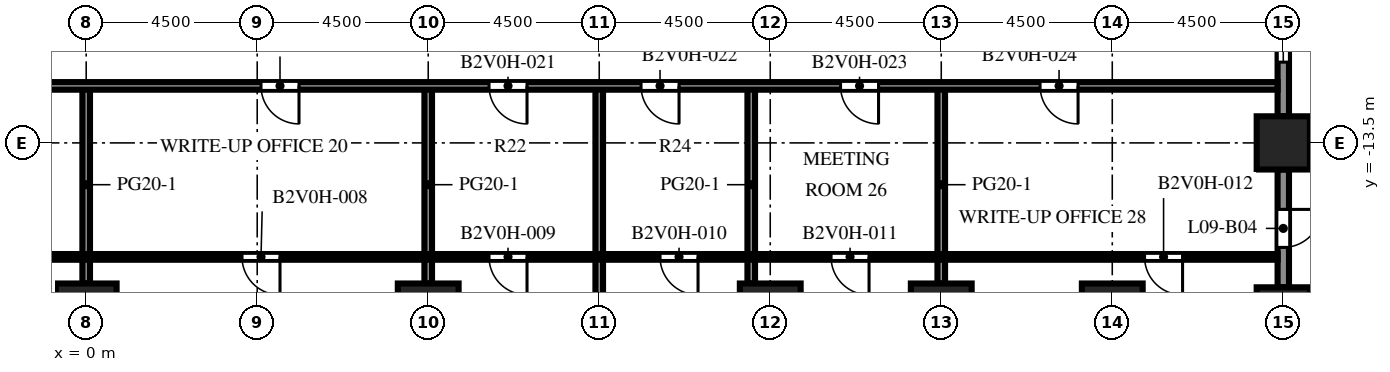
"""IFC4 building model, lengths in metres.
Left out: names, types, materials, properties, quantities, classifications, styles, units other than length and angle.
Written with IfcOpenShell. Run it as: python <this file> out.ifc"""

import sys

from ifc_helpers import new_model, si_unit, direction, frame, frame_2d, origin, origin_2d, place, context, subcontext, project, spatial, rectangle, extrude, element, fill, save


model = new_model("IFC4")
c1 = context("Model", 3, precision=1e-05, world=origin(), true_north=direction((0.0, 1.0)))
c2 = subcontext(c1, "Body", "Model", "MODEL_VIEW")
j1 = project(units=[si_unit("LENGTHUNIT", "METRE"), si_unit("PLANEANGLEUNIT", "RADIAN")], contexts=[c1])
p1 = place(None, origin())
s1 = spatial("IfcSite", under=j1, at=p1, CompositionType="ELEMENT")
p2 = place(p1, origin())
s2 = spatial("IfcBuilding", under=s1, at=p2, CompositionType="ELEMENT")
p3 = place(p2, frame((0.0, 0.0, 41.9)))
s3 = spatial("IfcBuildingStorey", under=s2, at=p3, CompositionType="ELEMENT", Elevation=41.9)
for number, where, z_axis, x_axis in (
    (1, (31.5, -18.0, -0.45), (0.0, 0.0, 1.0), (1.0, 0.0, 0.0)),
    (2, (31.5, -13.5, -0.45), (0.0, 0.0, 1.0), (1.0, 0.0, 0.0)),
):
    element("IfcColumn", number, at=place(p3, frame(where, z_axis=z_axis, x_axis=x_axis)), inside=s3, PredefinedType="COLUMN", context=c2, shape_type="SweptSolid", body=[
        extrude(rectangle(XDim=1.4, YDim=1.4, at=origin_2d()), origin(), (0.0, 0.0, 1.0), 4.55),
    ])
for number, where, z_axis, x_axis in (
    (3, (0.0, -18.0, 0.0), (0.0, 0.0, 1.0), (1.0, 0.0, 0.0)),
    (4, (9.0, -18.0, 0.0), (0.0, 0.0, 1.0), (1.0, 0.0, 0.0)),
):
    element("IfcColumn", number, at=place(p3, frame(where, z_axis=z_axis, x_axis=x_axis)), inside=s3, PredefinedType="COLUMN", context=c2, shape_type="SweptSolid", body=[
        extrude(rectangle(XDim=1.6, YDim=1.6, at=origin_2d()), origin(), (0.0, 0.0, 1.0), 4.1),
    ])
for number, where, z_axis, x_axis in (
    (5, (18.0, -18.0, -0.45), (0.0, 0.0, 1.0), (1.0, 0.0, 0.0)),
    (6, (22.5, -18.0, -0.45), (0.0, 0.0, 1.0), (1.0, 0.0, 0.0)),
    (7, (27.0, -18.0, -0.45), (0.0, 0.0, 1.0), (1.0, 0.0, 0.0)),
):
    element("IfcColumn", number, at=place(p3, frame(where, z_axis=z_axis, x_axis=x_axis)), inside=s3, PredefinedType="COLUMN", context=c2, shape_type="SweptSolid", body=[
        extrude(rectangle(XDim=1.6, YDim=1.6, at=origin_2d()), origin(), (0.0, 0.0, 1.0), 4.55),
    ])
p4 = place(p3, frame((31.5, -14.2, 0.0), z_axis=(0.0, 0.0, 1.0), x_axis=(0.0, -1.0, 0.0)))
e8 = element("IfcWall", 8, at=p4, inside=s3, PredefinedType="SOLIDWALL", context=c2, shape_type="SweptSolid", body=[
    extrude(rectangle(XDim=3.1, YDim=0.3, at=frame_2d((1.55, 0.0))), origin(), (0.0, 0.0, 1.0), 2.75),
])
p5 = place(p4, frame((1.05, 0.0, 0.0)))
e9 = element("IfcOpeningElement", 9, at=p5, cuts=e8, PredefinedType="OPENING", context=c2, shape_type="SweptSolid", body=[
    extrude(rectangle(XDim=1.0, YDim=2.2, at=frame_2d((0.5, 1.1))), frame((0.0, 0.16, 0.0), z_axis=(0.0, -1.0, 0.0), x_axis=(1.0, 0.0, 0.0)), (0.0, 0.0, 1.0), 0.32),
])
p6 = place(p3, frame((31.5, -9.7, 0.0), z_axis=(0.0, 0.0, 1.0), x_axis=(0.0, -1.0, 0.0)))
e10 = element("IfcWall", 10, at=p6, inside=s3, PredefinedType="SOLIDWALL", context=c2, shape_type="SweptSolid", body=[
    extrude(rectangle(XDim=3.1, YDim=0.3, at=frame_2d((1.55, 0.0))), origin(), (0.0, 0.0, 1.0), 2.75),
])
p7 = place(p6, frame((0.475, 0.0, 0.8)))
e11 = element("IfcOpeningElement", 11, at=p7, cuts=e10, PredefinedType="OPENING", context=c2, shape_type="SweptSolid", body=[
    extrude(rectangle(XDim=1.2, YDim=1.7, at=frame_2d((0.6, 0.85))), frame((0.0, 0.16, 0.0), z_axis=(0.0, -1.0, 0.0), x_axis=(1.0, 0.0, 0.0)), (0.0, 0.0, 1.0), 0.32),
])
for number, where, z_axis, x_axis in (
    (12, (0.0, -17.2, 0.0), (0.0, 0.0, 1.0), (0.0, 1.0, 0.0)),
    (13, (9.0, -17.2, 0.0), (0.0, 0.0, 1.0), (0.0, 1.0, 0.0)),
):
    element("IfcWall", number, at=place(p3, frame(where, z_axis=z_axis, x_axis=x_axis)), inside=s3, PredefinedType="PARTITIONING", context=c2, shape_type="SweptSolid", body=[
        extrude(rectangle(XDim=5.2, YDim=0.2, at=frame_2d((2.6, 0.0))), origin(), (0.0, 0.0, 1.0), 3.65),
    ])
p8 = place(p3, frame((13.5, -26.3, 0.0), z_axis=(0.0, 0.0, 1.0), x_axis=(0.0, 1.0, 0.0)))
e14 = element("IfcWall", 14, at=p8, inside=s3, PredefinedType="PARTITIONING", context=c2, shape_type="SweptSolid", body=[
    extrude(rectangle(XDim=14.3, YDim=0.2, at=frame_2d((7.15, 0.0))), origin(), (0.0, 0.0, 1.0), 3.65),
])
for number, where, z_axis, x_axis in (
    (15, (17.5, -17.2, 0.0), (0.0, 0.0, 1.0), (0.0, 1.0, 0.0)),
    (16, (22.5, -17.2, 0.0), (0.0, 0.0, 1.0), (0.0, 1.0, 0.0)),
):
    element("IfcWall", number, at=place(p3, frame(where, z_axis=z_axis, x_axis=x_axis)), inside=s3, PredefinedType="PARTITIONING", context=c2, shape_type="SweptSolid", body=[
        extrude(rectangle(XDim=5.2, YDim=0.2, at=frame_2d((2.6, 0.0))), origin(), (0.0, 0.0, 1.0), 3.65),
    ])
p9 = place(p3, frame((31.35, -16.5, 0.0), z_axis=(0.0, 0.0, 1.0), x_axis=(-1.0, 0.0, 0.0)))
e17 = element("IfcWall", 17, at=p9, inside=s3, PredefinedType="PARTITIONING", context=c2, shape_type="SweptSolid", body=[
    extrude(rectangle(XDim=53.7, YDim=0.15, at=frame_2d((26.85, 0.0))), origin(), (0.0, 0.0, 1.0), 3.65),
])
p10 = place(p9, frame((50.75, 0.0, 0.0)))
e18 = element("IfcOpeningElement", 18, at=p10, cuts=e17, PredefinedType="OPENING", context=c2, shape_type="SweptSolid", body=[
    extrude(rectangle(XDim=1.0, YDim=2.1, at=frame_2d((0.5, 1.05))), frame((0.0, 0.085, 0.0), z_axis=(0.0, -1.0, 0.0), x_axis=(1.0, 0.0, 0.0)), (0.0, 0.0, 1.0), 0.17),
])
p11 = place(p9, frame((43.75, 0.0, 0.0)))
e19 = element("IfcOpeningElement", 19, at=p11, cuts=e17, PredefinedType="OPENING", context=c2, shape_type="SweptSolid", body=[
    extrude(rectangle(XDim=1.0, YDim=2.1, at=frame_2d((0.5, 1.05))), frame((0.0, 0.085, 0.0), z_axis=(0.0, -1.0, 0.0), x_axis=(1.0, 0.0, 0.0)), (0.0, 0.0, 1.0), 0.17),
])
p12 = place(p9, frame((33.0, 0.0, 0.0)))
e20 = element("IfcOpeningElement", 20, at=p12, cuts=e17, PredefinedType="OPENING", context=c2, shape_type="SweptSolid", body=[
    extrude(rectangle(XDim=1.0, YDim=2.1, at=frame_2d((0.5, 1.05))), frame((0.0, 0.085, 0.0), z_axis=(0.0, -1.0, 0.0), x_axis=(1.0, 0.0, 0.0)), (0.0, 0.0, 1.0), 0.17),
])
p13 = place(p9, frame((26.25, 0.0, 0.0)))
e21 = element("IfcOpeningElement", 21, at=p13, cuts=e17, PredefinedType="OPENING", context=c2, shape_type="SweptSolid", body=[
    extrude(rectangle(XDim=1.0, YDim=2.1, at=frame_2d((0.5, 1.05))), frame((0.0, 0.085, 0.0), z_axis=(0.0, -1.0, 0.0), x_axis=(1.0, 0.0, 0.0)), (0.0, 0.0, 1.0), 0.17),
])
p14 = place(p9, frame((19.75, 0.0, 0.0)))
e22 = element("IfcOpeningElement", 22, at=p14, cuts=e17, PredefinedType="OPENING", context=c2, shape_type="SweptSolid", body=[
    extrude(rectangle(XDim=1.0, YDim=2.1, at=frame_2d((0.5, 1.05))), frame((0.0, 0.085, 0.0), z_axis=(0.0, -1.0, 0.0), x_axis=(1.0, 0.0, 0.0)), (0.0, 0.0, 1.0), 0.17),
])
p15 = place(p9, frame((15.25, 0.0, 0.0)))
e23 = element("IfcOpeningElement", 23, at=p15, cuts=e17, PredefinedType="OPENING", context=c2, shape_type="SweptSolid", body=[
    extrude(rectangle(XDim=1.0, YDim=2.1, at=frame_2d((0.5, 1.05))), frame((0.0, 0.085, 0.0), z_axis=(0.0, -1.0, 0.0), x_axis=(1.0, 0.0, 0.0)), (0.0, 0.0, 1.0), 0.17),
])
p16 = place(p9, frame((10.75, 0.0, 0.0)))
e24 = element("IfcOpeningElement", 24, at=p16, cuts=e17, PredefinedType="OPENING", context=c2, shape_type="SweptSolid", body=[
    extrude(rectangle(XDim=1.0, YDim=2.1, at=frame_2d((0.5, 1.05))), frame((0.0, 0.085, 0.0), z_axis=(0.0, -1.0, 0.0), x_axis=(1.0, 0.0, 0.0)), (0.0, 0.0, 1.0), 0.17),
])
p17 = place(p9, frame((2.5, 0.0, 0.0)))
e25 = element("IfcOpeningElement", 25, at=p17, cuts=e17, PredefinedType="OPENING", context=c2, shape_type="SweptSolid", body=[
    extrude(rectangle(XDim=1.0, YDim=2.1, at=frame_2d((0.5, 1.05))), frame((0.0, 0.085, 0.0), z_axis=(0.0, -1.0, 0.0), x_axis=(1.0, 0.0, 0.0)), (0.0, 0.0, 1.0), 0.17),
])
p18 = place(p3, frame((31.35, -12.0, 0.0), z_axis=(0.0, 0.0, 1.0), x_axis=(-1.0, 0.0, 0.0)))
e26 = element("IfcWall", 26, at=p18, inside=s3, PredefinedType="PARTITIONING", context=c2, shape_type="SweptSolid", body=[
    extrude(rectangle(XDim=53.7, YDim=0.2, at=frame_2d((26.85, 0.0))), origin(), (0.0, 0.0, 1.0), 3.65),
])
p19 = place(p18, frame((51.5, 0.0, 0.0)))
e27 = element("IfcOpeningElement", 27, at=p19, cuts=e26, PredefinedType="OPENING", context=c2, shape_type="SweptSolid", body=[
    extrude(rectangle(XDim=1.0, YDim=2.1, at=frame_2d((0.5, 1.05))), frame((0.0, 0.11, 0.0), z_axis=(0.0, -1.0, 0.0), x_axis=(1.0, 0.0, 0.0)), (0.0, 0.0, 1.0), 0.22),
])
p20 = place(p18, frame((40.5, 0.0, 0.0)))
e28 = element("IfcOpeningElement", 28, at=p20, cuts=e26, PredefinedType="OPENING", context=c2, shape_type="SweptSolid", body=[
    extrude(rectangle(XDim=1.0, YDim=2.1, at=frame_2d((0.5, 1.05))), frame((0.0, 0.11, 0.0), z_axis=(0.0, -1.0, 0.0), x_axis=(1.0, 0.0, 0.0)), (0.0, 0.0, 1.0), 0.22),
])
p21 = place(p18, frame((33.5, 0.0, 0.0)))
e29 = element("IfcOpeningElement", 29, at=p21, cuts=e26, PredefinedType="OPENING", context=c2, shape_type="SweptSolid", body=[
    extrude(rectangle(XDim=1.0, YDim=2.1, at=frame_2d((0.5, 1.05))), frame((0.0, 0.11, 0.0), z_axis=(0.0, -1.0, 0.0), x_axis=(1.0, 0.0, 0.0)), (0.0, 0.0, 1.0), 0.22),
])
p22 = place(p18, frame((25.75, 0.0, 0.0)))
e30 = element("IfcOpeningElement", 30, at=p22, cuts=e26, PredefinedType="OPENING", context=c2, shape_type="SweptSolid", body=[
    extrude(rectangle(XDim=1.0, YDim=2.1, at=frame_2d((0.5, 1.05))), frame((0.0, 0.11, 0.0), z_axis=(0.0, -1.0, 0.0), x_axis=(1.0, 0.0, 0.0)), (0.0, 0.0, 1.0), 0.22),
])
p23 = place(p18, frame((19.75, 0.0, 0.0)))
e31 = element("IfcOpeningElement", 31, at=p23, cuts=e26, PredefinedType="OPENING", context=c2, shape_type="SweptSolid", body=[
    extrude(rectangle(XDim=1.0, YDim=2.1, at=frame_2d((0.5, 1.05))), frame((0.0, 0.11, 0.0), z_axis=(0.0, -1.0, 0.0), x_axis=(1.0, 0.0, 0.0)), (0.0, 0.0, 1.0), 0.22),
])
p24 = place(p18, frame((15.75, 0.0, 0.0)))
e32 = element("IfcOpeningElement", 32, at=p24, cuts=e26, PredefinedType="OPENING", context=c2, shape_type="SweptSolid", body=[
    extrude(rectangle(XDim=1.0, YDim=2.1, at=frame_2d((0.5, 1.05))), frame((0.0, 0.11, 0.0), z_axis=(0.0, -1.0, 0.0), x_axis=(1.0, 0.0, 0.0)), (0.0, 0.0, 1.0), 0.22),
])
p25 = place(p18, frame((10.5, 0.0, 0.0)))
e33 = element("IfcOpeningElement", 33, at=p25, cuts=e26, PredefinedType="OPENING", context=c2, shape_type="SweptSolid", body=[
    extrude(rectangle(XDim=1.0, YDim=2.1, at=frame_2d((0.5, 1.05))), frame((0.0, 0.11, 0.0), z_axis=(0.0, -1.0, 0.0), x_axis=(1.0, 0.0, 0.0)), (0.0, 0.0, 1.0), 0.22),
])
p26 = place(p18, frame((5.25, 0.0, 0.0)))
e34 = element("IfcOpeningElement", 34, at=p26, cuts=e26, PredefinedType="OPENING", context=c2, shape_type="SweptSolid", body=[
    extrude(rectangle(XDim=1.0, YDim=2.1, at=frame_2d((0.5, 1.05))), frame((0.0, 0.11, 0.0), z_axis=(0.0, -1.0, 0.0), x_axis=(1.0, 0.0, 0.0)), (0.0, 0.0, 1.0), 0.22),
])
p27 = place(p5, origin())
e35 = element("IfcDoor", 35, at=p27, inside=s3, OperationType="SINGLE_SWING_LEFT", PredefinedType="DOOR", context=c2, shape_type="SweptSolid", body=[
    extrude(rectangle(XDim=1.0, YDim=2.2, at=frame_2d((0.5, 1.1))), frame((0.0, 0.025, 0.0), z_axis=(0.0, -1.0, 0.0), x_axis=(1.0, 0.0, 0.0)), (0.0, 0.0, 1.0), 0.05),
])
fill(e9, e35)
p28 = place(p7, origin())
e36 = element("IfcWindow", 36, at=p28, inside=s3, PartitioningType="SINGLE_PANEL", PredefinedType="WINDOW", context=c2, shape_type="SweptSolid", body=[
    extrude(rectangle(XDim=1.2, YDim=1.7, at=frame_2d((0.6, 0.85))), frame((0.0, 0.03, 0.0), z_axis=(0.0, -1.0, 0.0), x_axis=(1.0, 0.0, 0.0)), (0.0, 0.0, 1.0), 0.06),
])
fill(e11, e36)
p29 = place(p13, origin())
e37 = element("IfcDoor", 37, at=p29, inside=s3, OperationType="SINGLE_SWING_LEFT", PredefinedType="DOOR", context=c2, shape_type="SweptSolid", body=[
    extrude(rectangle(XDim=1.0, YDim=2.1, at=frame_2d((0.5, 1.05))), frame((0.0, 0.025, 0.0), z_axis=(0.0, -1.0, 0.0), x_axis=(1.0, 0.0, 0.0)), (0.0, 0.0, 1.0), 0.05),
])
fill(e21, e37)
p30 = place(p14, origin())
e38 = element("IfcDoor", 38, at=p30, inside=s3, OperationType="SINGLE_SWING_LEFT", PredefinedType="DOOR", context=c2, shape_type="SweptSolid", body=[
    extrude(rectangle(XDim=1.0, YDim=2.1, at=frame_2d((0.5, 1.05))), frame((0.0, 0.025, 0.0), z_axis=(0.0, -1.0, 0.0), x_axis=(1.0, 0.0, 0.0)), (0.0, 0.0, 1.0), 0.05),
])
fill(e22, e38)
p31 = place(p15, origin())
e39 = element("IfcDoor", 39, at=p31, inside=s3, OperationType="SINGLE_SWING_LEFT", PredefinedType="DOOR", context=c2, shape_type="SweptSolid", body=[
    extrude(rectangle(XDim=1.0, YDim=2.1, at=frame_2d((0.5, 1.05))), frame((0.0, 0.025, 0.0), z_axis=(0.0, -1.0, 0.0), x_axis=(1.0, 0.0, 0.0)), (0.0, 0.0, 1.0), 0.05),
])
fill(e23, e39)
p32 = place(p16, origin())
e40 = element("IfcDoor", 40, at=p32, inside=s3, OperationType="SINGLE_SWING_LEFT", PredefinedType="DOOR", context=c2, shape_type="SweptSolid", body=[
    extrude(rectangle(XDim=1.0, YDim=2.1, at=frame_2d((0.5, 1.05))), frame((0.0, 0.025, 0.0), z_axis=(0.0, -1.0, 0.0), x_axis=(1.0, 0.0, 0.0)), (0.0, 0.0, 1.0), 0.05),
])
fill(e24, e40)
p33 = place(p17, origin())
e41 = element("IfcDoor", 41, at=p33, inside=s3, OperationType="SINGLE_SWING_LEFT", PredefinedType="DOOR", context=c2, shape_type="SweptSolid", body=[
    extrude(rectangle(XDim=1.0, YDim=2.1, at=frame_2d((0.5, 1.05))), frame((0.0, 0.025, 0.0), z_axis=(0.0, -1.0, 0.0), x_axis=(1.0, 0.0, 0.0)), (0.0, 0.0, 1.0), 0.05),
])
fill(e25, e41)
p34 = place(p22, origin())
e42 = element("IfcDoor", 42, at=p34, inside=s3, OperationType="SINGLE_SWING_LEFT", PredefinedType="DOOR", context=c2, shape_type="SweptSolid", body=[
    extrude(rectangle(XDim=1.0, YDim=2.1, at=frame_2d((0.5, 1.05))), frame((0.0, 0.025, 0.0), z_axis=(0.0, -1.0, 0.0), x_axis=(1.0, 0.0, 0.0)), (0.0, 0.0, 1.0), 0.05),
])
fill(e30, e42)
p35 = place(p23, origin())
e43 = element("IfcDoor", 43, at=p35, inside=s3, OperationType="SINGLE_SWING_LEFT", PredefinedType="DOOR", context=c2, shape_type="SweptSolid", body=[
    extrude(rectangle(XDim=1.0, YDim=2.1, at=frame_2d((0.5, 1.05))), frame((0.0, 0.025, 0.0), z_axis=(0.0, -1.0, 0.0), x_axis=(1.0, 0.0, 0.0)), (0.0, 0.0, 1.0), 0.05),
])
fill(e31, e43)
p36 = place(p24, origin())
e44 = element("IfcDoor", 44, at=p36, inside=s3, OperationType="SINGLE_SWING_LEFT", PredefinedType="DOOR", context=c2, shape_type="SweptSolid", body=[
    extrude(rectangle(XDim=1.0, YDim=2.1, at=frame_2d((0.5, 1.05))), frame((0.0, 0.025, 0.0), z_axis=(0.0, -1.0, 0.0), x_axis=(1.0, 0.0, 0.0)), (0.0, 0.0, 1.0), 0.05),
])
fill(e32, e44)
p37 = place(p25, origin())
e45 = element("IfcDoor", 45, at=p37, inside=s3, OperationType="SINGLE_SWING_LEFT", PredefinedType="DOOR", context=c2, shape_type="SweptSolid", body=[
    extrude(rectangle(XDim=1.0, YDim=2.1, at=frame_2d((0.5, 1.05))), frame((0.0, 0.025, 0.0), z_axis=(0.0, -1.0, 0.0), x_axis=(1.0, 0.0, 0.0)), (0.0, 0.0, 1.0), 0.05),
])
fill(e33, e45)
p38 = place(p26, origin())
e46 = element("IfcDoor", 46, at=p38, inside=s3, OperationType="SINGLE_SWING_LEFT", PredefinedType="DOOR", context=c2, shape_type="SweptSolid", body=[
    extrude(rectangle(XDim=1.0, YDim=2.1, at=frame_2d((0.5, 1.05))), frame((0.0, 0.025, 0.0), z_axis=(0.0, -1.0, 0.0), x_axis=(1.0, 0.0, 0.0)), (0.0, 0.0, 1.0), 0.05),
])
fill(e34, e46)
save(model, sys.argv[1])
